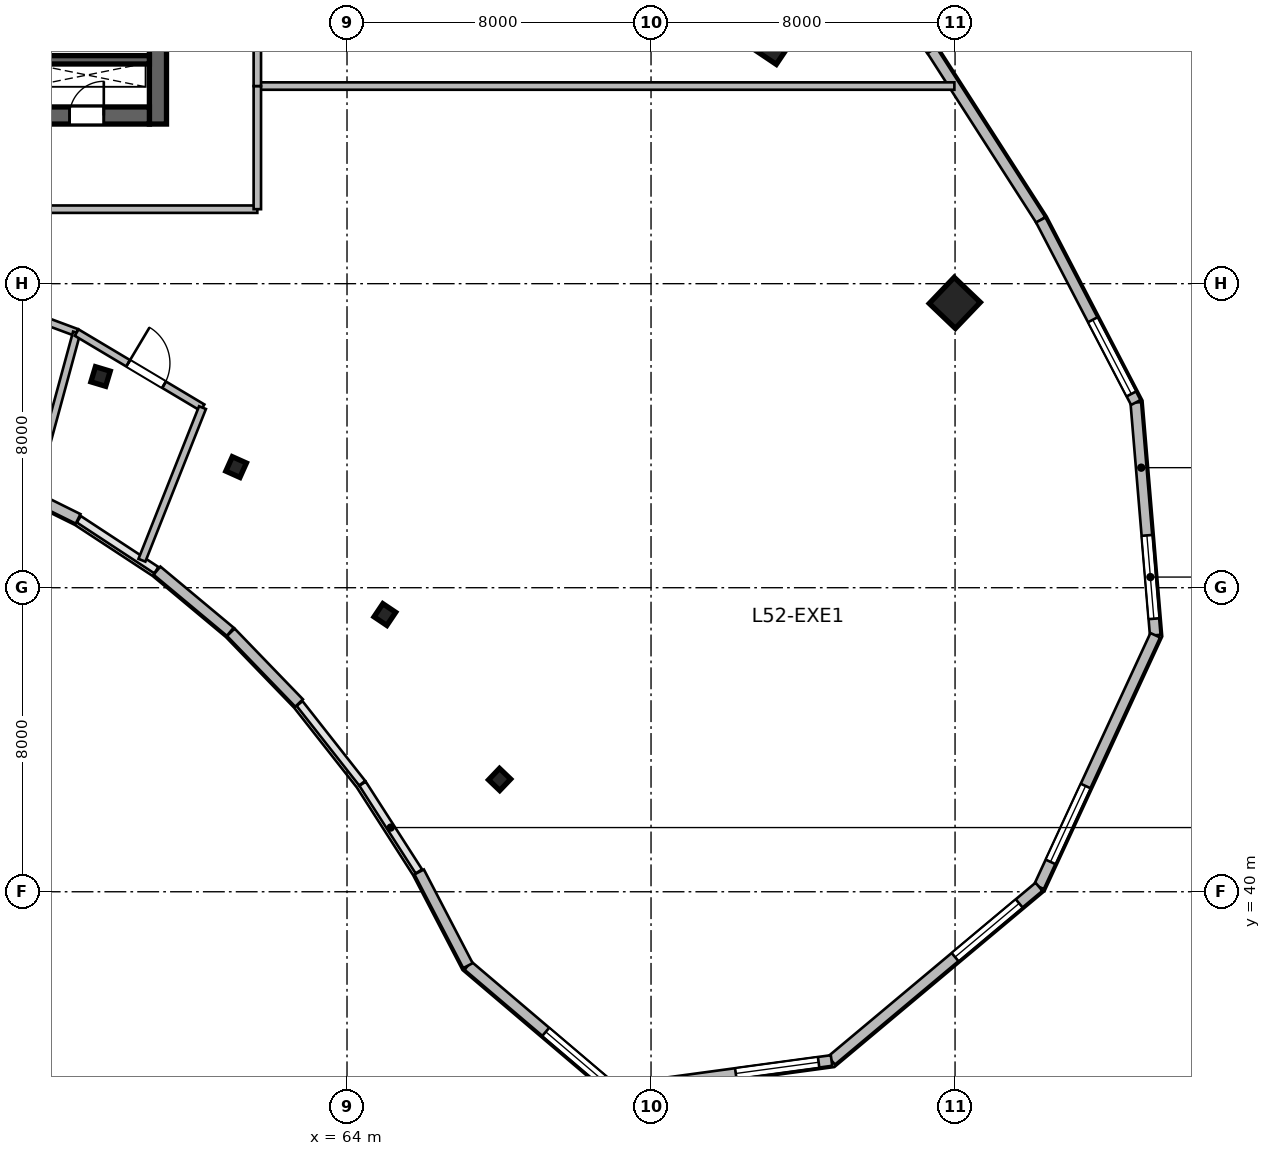
"""IFC4 building model, lengths in metres.
Left out: names, types, materials, properties, quantities, classifications, styles, units other than length and angle.
Written with IfcOpenShell. Run it as: python <this file> out.ifc"""

import sys

from ifc_helpers import new_model, si_unit, direction, frame, frame_2d, origin, origin_2d, place, context, subcontext, project, spatial, rectangle, i_section, extrude, source, transform, mapped, element, fill, save


model = new_model("IFC4")
c1 = context("Model", 3, precision=1e-05, world=origin(), true_north=direction((0.0, 1.0)))
c2 = subcontext(c1, "Body", "Model", "MODEL_VIEW")
j1 = project(units=[si_unit("LENGTHUNIT", "METRE"), si_unit("PLANEANGLEUNIT", "RADIAN")], contexts=[c1])
p1 = place(None, origin())
s1 = spatial("IfcSite", under=j1, at=p1, CompositionType="ELEMENT")
p2 = place(p1, origin())
s2 = spatial("IfcBuilding", under=s1, at=p2, CompositionType="ELEMENT")
p3 = place(p2, frame((0.0, 0.0, 215.7)))
s3 = spatial("IfcBuildingStorey", under=s2, at=p3, CompositionType="ELEMENT", Elevation=215.7)
m1 = source(origin(), c2, "Body", "SweptSolid", [
    extrude(rectangle(XDim=12.0, YDim=0.45, at=frame_2d((6.0, 0.0))), origin(), (0.0, 0.0, 1.0), 3.9),
])
p4 = place(p3, frame((59.025, 60.2, 0.0), z_axis=(0.0, 0.0, 1.0), x_axis=(0.0, 1.0, 0.0)))
e1 = element("IfcWall", 1, at=p4, inside=s3, PredefinedType="SHEAR", context=c2, shape_type="MappedRepresentation", body=[
    mapped(m1, transform((0.0, 0.0, 0.0), scale=1.0)),
])
m2 = source(origin(), c2, "Body", "SweptSolid", [
    extrude(rectangle(XDim=21.6, YDim=0.45, at=frame_2d((10.8, 0.0))), origin(), (0.0, 0.0, 1.0), 3.9),
])
p5 = place(p3, frame((37.2, 60.425, 0.0), z_axis=(0.0, 0.0, 1.0), x_axis=(1.0, 0.0, 0.0)))
e2 = element("IfcWall", 2, at=p5, inside=s3, PredefinedType="SHEAR", context=c2, shape_type="MappedRepresentation", body=[
    mapped(m2, transform((0.0, 0.0, 0.0), scale=1.0)),
])
p6 = place(p5, frame((1.1, 0.0, 0.0)))
e3 = element("IfcOpeningElement", 3, at=p6, cuts=e2, PredefinedType="OPENING", context=c2, shape_type="SweptSolid", body=[
    extrude(rectangle(XDim=1.15, YDim=2.15, at=frame_2d((0.575, 1.075))), frame((0.0, 0.235, 0.0), z_axis=(0.0, -1.0, 0.0), x_axis=(1.0, 0.0, 0.0)), (0.0, 0.0, 1.0), 0.47),
])
p7 = place(p5, frame((19.5, 0.0, 0.0)))
e4 = element("IfcOpeningElement", 4, at=p7, cuts=e2, PredefinedType="OPENING", context=c2, shape_type="SweptSolid", body=[
    extrude(rectangle(XDim=0.9, YDim=2.1, at=frame_2d((0.45, 1.05))), frame((0.0, 0.235, 0.0), z_axis=(0.0, -1.0, 0.0), x_axis=(1.0, 0.0, 0.0)), (0.0, 0.0, 1.0), 0.47),
])
p8 = place(p5, frame((12.02, 0.0, 0.0)))
e5 = element("IfcOpeningElement", 5, at=p8, cuts=e2, PredefinedType="OPENING", context=c2, shape_type="SweptSolid", body=[
    extrude(rectangle(XDim=1.6, YDim=2.15, at=frame_2d((0.8, 1.075))), frame((0.0, 0.235, 0.0), z_axis=(0.0, -1.0, 0.0), x_axis=(1.0, 0.0, 0.0)), (0.0, 0.0, 1.0), 0.47),
])
m3 = source(origin(), c2, "Body", "SweptSolid", [
    extrude(rectangle(XDim=3.27, YDim=0.22, at=frame_2d((1.635, 0.0))), origin(), (0.0, 0.0, 1.0), 3.9),
])
p9 = place(p3, frame((55.53, 61.89, 0.0), z_axis=(0.0, 0.0, 1.0), x_axis=(1.0, 0.0, 0.0)))
e6 = element("IfcWall", 6, at=p9, inside=s3, PredefinedType="SHEAR", context=c2, shape_type="MappedRepresentation", body=[
    mapped(m3, transform((0.0, 0.0, 0.0), scale=1.0)),
])
m4 = source(origin(), c2, "Body", "SweptSolid", [
    extrude(i_section(OverallWidth=0.406, OverallDepth=0.416, WebThickness=0.03, FlangeThickness=0.048, at=origin_2d()), origin(), (0.0, 0.0, 1.0), 3.9),
])
for number, where, z_axis, x_axis in (
    (7, (57.515, 53.558, 0.0), (0.0, 0.0, 1.0), (0.289, 0.957, 0.0)),
    (8, (61.082, 51.175, 0.0), (0.0, 0.0, 1.0), (0.409, 0.912, 0.0)),
    (9, (64.996, 47.294, 0.0), (0.0, 0.0, 1.0), (0.558, 0.83, 0.0)),
):
    element("IfcColumn", number, at=place(p3, frame(where, z_axis=z_axis, x_axis=x_axis)), inside=s3, PredefinedType="COLUMN", context=c2, shape_type="MappedRepresentation", body=[
        mapped(m4, transform((0.0, 0.0, 0.0), scale=1.0)),
    ])
m5 = source(origin(), c2, "Body", "SweptSolid", [
    extrude(rectangle(XDim=0.95, YDim=0.95, at=origin_2d()), origin(), (0.0, 0.0, 1.0), 3.9),
])
p10 = place(p3, frame((75.167, 62.43, 0.0), z_axis=(0.0, 0.0, 1.0), x_axis=(0.55774510898, 0.830012285095, 0.0)))
e10 = element("IfcColumn", 10, at=p10, inside=s3, PredefinedType="COLUMN", context=c2, shape_type="MappedRepresentation", body=[
    mapped(m5, transform((0.0, 0.0, 0.0), scale=1.0)),
])
p11 = place(p3, frame((68.015, 42.955, 0.0), z_axis=(0.0, 0.0, 1.0), x_axis=(0.690756218984, 0.723087716626, 0.0)))
e11 = element("IfcColumn", 11, at=p11, inside=s3, PredefinedType="COLUMN", context=c2, shape_type="MappedRepresentation", body=[
    mapped(m4, transform((0.0, 0.0, 0.0), scale=1.0)),
])
p12 = place(p3, frame((79.993, 55.494, 0.0), z_axis=(0.0, 0.0, 1.0), x_axis=(0.690756218984, 0.723087716626, 0.0)))
e12 = element("IfcColumn", 12, at=p12, inside=s3, PredefinedType="COLUMN", context=c2, shape_type="MappedRepresentation", body=[
    mapped(m5, transform((0.0, 0.0, 0.0), scale=1.0)),
])
m6 = source(origin(), c2, "Body", "SweptSolid", [
    extrude(rectangle(XDim=6.146, YDim=0.28, at=frame_2d((3.073, 0.0))), origin(), (0.0, 0.0, 1.0), 3.64),
])
p13 = place(p3, frame((84.756, 52.874, 0.0), z_axis=(0.0, 0.0, 1.0), x_axis=(0.083301904456, -0.996524356307, 0.0)))
e13 = element("IfcWall", 13, at=p13, inside=s3, PredefinedType="SOLIDWALL", context=c2, shape_type="MappedRepresentation", body=[
    mapped(m6, transform((0.0, 0.0, 0.0), scale=1.0)),
])
p14 = place(p13, frame((3.509, 0.0, 0.95)))
e14 = element("IfcOpeningElement", 14, at=p14, cuts=e13, PredefinedType="OPENING", context=c2, shape_type="SweptSolid", body=[
    extrude(rectangle(XDim=2.2, YDim=2.1, at=frame_2d((1.1, 1.05))), frame((0.0, 0.15, 0.0), z_axis=(0.0, -1.0, 0.0), x_axis=(1.0, 0.0, 0.0)), (0.0, 0.0, 1.0), 0.3),
])
m7 = source(origin(), c2, "Body", "SweptSolid", [
    extrude(rectangle(XDim=7.292, YDim=0.28, at=frame_2d((3.646, 0.0))), origin(), (0.0, 0.0, 1.0), 3.64),
])
p15 = place(p3, frame((85.268, 46.749, 0.0), z_axis=(0.0, 0.0, 1.0), x_axis=(-0.419642001049, -0.907689699708, 0.0)))
e15 = element("IfcWall", 15, at=p15, inside=s3, PredefinedType="SOLIDWALL", context=c2, shape_type="MappedRepresentation", body=[
    mapped(m7, transform((0.0, 0.0, 0.0), scale=1.0)),
])
p16 = place(p15, frame((4.369, 0.0, 0.95)))
e16 = element("IfcOpeningElement", 16, at=p16, cuts=e15, PredefinedType="OPENING", context=c2, shape_type="SweptSolid", body=[
    extrude(rectangle(XDim=2.2, YDim=2.1, at=frame_2d((1.1, 1.05))), frame((0.0, 0.15, 0.0), z_axis=(0.0, -1.0, 0.0), x_axis=(1.0, 0.0, 0.0)), (0.0, 0.0, 1.0), 0.3),
])
m8 = source(origin(), c2, "Body", "SweptSolid", [
    extrude(rectangle(XDim=7.12, YDim=0.28, at=frame_2d((3.56, 0.0))), origin(), (0.0, 0.0, 1.0), 3.64),
])
p17 = place(p3, frame((82.208, 40.131, 0.0), z_axis=(0.0, 0.0, 1.0), x_axis=(-0.766709783564, -0.641993853387, 0.0)))
e17 = element("IfcWall", 17, at=p17, inside=s3, PredefinedType="SOLIDWALL", context=c2, shape_type="MappedRepresentation", body=[
    mapped(m8, transform((0.0, 0.0, 0.0), scale=1.0)),
])
p18 = place(p17, frame((0.68, 0.0, 0.95)))
e18 = element("IfcOpeningElement", 18, at=p18, cuts=e17, PredefinedType="OPENING", context=c2, shape_type="SweptSolid", body=[
    extrude(rectangle(XDim=2.2, YDim=2.1, at=frame_2d((1.1, 1.05))), frame((0.0, 0.15, 0.0), z_axis=(0.0, -1.0, 0.0), x_axis=(1.0, 0.0, 0.0)), (0.0, 0.0, 1.0), 0.3),
])
m9 = source(origin(), c2, "Body", "SweptSolid", [
    extrude(rectangle(XDim=5.771, YDim=0.28, at=frame_2d((2.886, 0.0))), origin(), (0.0, 0.0, 1.0), 3.64),
])
p19 = place(p3, frame((76.75, 35.56, 0.0), z_axis=(0.0, 0.0, 1.0), x_axis=(-0.990933615537, -0.134352408237, 0.0)))
e19 = element("IfcWall", 19, at=p19, inside=s3, PredefinedType="SOLIDWALL", context=c2, shape_type="MappedRepresentation", body=[
    mapped(m9, transform((0.0, 0.0, 0.0), scale=1.0)),
])
p20 = place(p19, frame((0.343, 0.0, 0.95)))
e20 = element("IfcOpeningElement", 20, at=p20, cuts=e19, PredefinedType="OPENING", context=c2, shape_type="SweptSolid", body=[
    extrude(rectangle(XDim=2.2, YDim=2.1, at=frame_2d((1.1, 1.05))), frame((0.0, 0.15, 0.0), z_axis=(0.0, -1.0, 0.0), x_axis=(1.0, 0.0, 0.0)), (0.0, 0.0, 1.0), 0.3),
])
m10 = source(origin(), c2, "Body", "SweptSolid", [
    extrude(rectangle(XDim=5.051, YDim=0.28, at=frame_2d((2.525, 0.0))), origin(), (0.0, 0.0, 1.0), 3.64),
])
p21 = place(p3, frame((71.031, 34.784, 0.0), z_axis=(0.0, 0.0, 1.0), x_axis=(-0.761904731537, 0.647689107568, 0.0)))
e21 = element("IfcWall", 21, at=p21, inside=s3, PredefinedType="SOLIDWALL", context=c2, shape_type="MappedRepresentation", body=[
    mapped(m10, transform((0.0, 0.0, 0.0), scale=1.0)),
])
p22 = place(p21, frame((0.163, 0.0, 0.95)))
e22 = element("IfcOpeningElement", 22, at=p22, cuts=e21, PredefinedType="OPENING", context=c2, shape_type="SweptSolid", body=[
    extrude(rectangle(XDim=2.2, YDim=2.1, at=frame_2d((1.1, 1.05))), frame((0.0, 0.15, 0.0), z_axis=(0.0, -1.0, 0.0), x_axis=(1.0, 0.0, 0.0)), (0.0, 0.0, 1.0), 0.3),
])
m11 = source(origin(), c2, "Body", "SweptSolid", [
    extrude(rectangle(XDim=2.779, YDim=0.28, at=frame_2d((1.39, 0.0))), origin(), (0.0, 0.0, 1.0), 3.64),
])
p23 = place(p3, frame((67.182, 38.056, 0.0), z_axis=(0.0, 0.0, 1.0), x_axis=(-0.461770308601, 0.886999538948, 0.0)))
e23 = element("IfcWall", 23, at=p23, inside=s3, PredefinedType="SOLIDWALL", context=c2, shape_type="MappedRepresentation", body=[
    mapped(m11, transform((0.0, 0.0, 0.0), scale=1.0)),
])
m12 = source(origin(), c2, "Body", "SweptSolid", [
    extrude(rectangle(XDim=2.588, YDim=0.28, at=frame_2d((1.294, 0.0))), origin(), (0.0, 0.0, 1.0), 3.64),
])
p24 = place(p3, frame((62.74, 44.966, 0.0), z_axis=(0.0, 0.0, 1.0), x_axis=(-0.694687114507, 0.719312041424, 0.0)))
e24 = element("IfcWall", 24, at=p24, inside=s3, PredefinedType="SOLIDWALL", context=c2, shape_type="MappedRepresentation", body=[
    mapped(m12, transform((0.0, 0.0, 0.0), scale=1.0)),
])
m13 = source(origin(), c2, "Body", "SweptSolid", [
    extrude(rectangle(XDim=2.511, YDim=0.28, at=frame_2d((1.256, 0.0))), origin(), (0.0, 0.0, 1.0), 3.64),
])
p25 = place(p3, frame((60.928, 46.841, 0.0), z_axis=(0.0, 0.0, 1.0), x_axis=(-0.767910416122, 0.640557251782, 0.0)))
e25 = element("IfcWall", 25, at=p25, inside=s3, PredefinedType="SOLIDWALL", context=c2, shape_type="MappedRepresentation", body=[
    mapped(m13, transform((0.0, 0.0, 0.0), scale=1.0)),
])
m14 = source(origin(), c2, "Body", "SweptSolid", [
    extrude(rectangle(XDim=2.378, YDim=0.28, at=frame_2d((1.189, 0.0))), origin(), (0.0, 0.0, 1.0), 3.64),
])
p26 = place(p3, frame((56.924, 49.812, 0.0), z_axis=(0.0, 0.0, 1.0), x_axis=(-0.895941616831, 0.444171835252, 0.0)))
e26 = element("IfcWall", 26, at=p26, inside=s3, PredefinedType="SOLIDWALL", context=c2, shape_type="MappedRepresentation", body=[
    mapped(m14, transform((0.0, 0.0, 0.0), scale=1.0)),
])
m15 = source(origin(), c2, "Body", "SweptSolid", [
    extrude(rectangle(XDim=5.153, YDim=0.28, at=frame_2d((2.577, 0.0))), origin(), (0.0, 0.0, 1.0), 3.64),
])
p27 = place(p3, frame((76.205, 66.19, 0.0), z_axis=(0.0, 0.0, 1.0), x_axis=(0.618179283891, -0.786037132054, 0.0)))
e27 = element("IfcWall", 27, at=p27, inside=s3, PredefinedType="SOLIDWALL", context=c2, shape_type="MappedRepresentation", body=[
    mapped(m15, transform((0.0, 0.0, 0.0), scale=1.0)),
])
m16 = source(origin(), c2, "Body", "SweptSolid", [
    extrude(rectangle(XDim=5.303, YDim=0.28, at=frame_2d((2.651, 0.0))), origin(), (0.0, 0.0, 1.0), 3.64),
])
p28 = place(p3, frame((79.391, 62.14, 0.0), z_axis=(0.0, 0.0, 1.0), x_axis=(0.540178067041, -0.84155074469, 0.0)))
e28 = element("IfcWall", 28, at=p28, inside=s3, PredefinedType="SOLIDWALL", context=c2, shape_type="MappedRepresentation", body=[
    mapped(m16, transform((0.0, 0.0, 0.0), scale=1.0)),
])
m17 = source(origin(), c2, "Body", "SweptSolid", [
    extrude(rectangle(XDim=5.416, YDim=0.28, at=frame_2d((2.708, 0.0))), origin(), (0.0, 0.0, 1.0), 3.64),
])
p29 = place(p3, frame((82.255, 57.677, 0.0), z_axis=(0.0, 0.0, 1.0), x_axis=(0.46177852435, -0.886995261796, 0.0)))
e29 = element("IfcWall", 29, at=p29, inside=s3, PredefinedType="SOLIDWALL", context=c2, shape_type="MappedRepresentation", body=[
    mapped(m17, transform((0.0, 0.0, 0.0), scale=1.0)),
])
p30 = place(p29, frame((2.962, 0.0, 0.95)))
e30 = element("IfcOpeningElement", 30, at=p30, cuts=e29, PredefinedType="OPENING", context=c2, shape_type="SweptSolid", body=[
    extrude(rectangle(XDim=2.2, YDim=2.1, at=frame_2d((1.1, 1.05))), frame((0.0, 0.15, 0.0), z_axis=(0.0, -1.0, 0.0), x_axis=(1.0, 0.0, 0.0)), (0.0, 0.0, 1.0), 0.3),
])
m18 = source(origin(), c2, "Body", "SweptSolid", [
    extrude(rectangle(XDim=4.191, YDim=0.195, at=frame_2d((2.095, 0.0))), origin(), (0.0, 0.0, 1.0), 3.64),
])
p31 = place(p3, frame((52.957, 56.174, 0.0), z_axis=(0.0, 0.0, 1.0), x_axis=(0.937361695407, -0.348357649527, 0.0)))
e31 = element("IfcWall", 31, at=p31, inside=s3, PredefinedType="PARTITIONING", context=c2, shape_type="MappedRepresentation", body=[
    mapped(m18, transform((0.0, 0.0, 0.0), scale=1.0)),
])
p32 = place(p31, frame((1.545, 0.0, 0.0)))
e32 = element("IfcOpeningElement", 32, at=p32, cuts=e31, PredefinedType="OPENING", context=c2, shape_type="SweptSolid", body=[
    extrude(rectangle(XDim=1.1, YDim=2.15, at=frame_2d((0.55, 1.075))), frame((0.0, 0.107, 0.0), z_axis=(0.0, -1.0, 0.0), x_axis=(1.0, 0.0, 0.0)), (0.0, 0.0, 1.0), 0.215),
])
m19 = source(origin(), c2, "Body", "SweptSolid", [
    extrude(rectangle(XDim=4.449, YDim=0.195, at=frame_2d((2.225, 0.0))), origin(), (0.0, 0.0, 1.0), 3.64),
])
p33 = place(p3, frame((55.719, 50.42, 0.0), z_axis=(0.0, 0.0, 1.0), x_axis=(0.262123660516, 0.965034292965, 0.0)))
e33 = element("IfcWall", 33, at=p33, inside=s3, PredefinedType="PARTITIONING", context=c2, shape_type="MappedRepresentation", body=[
    mapped(m19, transform((0.0, 0.0, 0.0), scale=1.0)),
])
m20 = source(origin(), c2, "Body", "SweptSolid", [
    extrude(rectangle(XDim=3.856, YDim=0.195, at=frame_2d((1.928, 0.0))), origin(), (0.0, 0.0, 1.0), 3.64),
])
p34 = place(p3, frame((56.886, 54.714, 0.0), z_axis=(0.0, 0.0, 1.0), x_axis=(0.858797511375, -0.512315171019, 0.0)))
e34 = element("IfcWall", 34, at=p34, inside=s3, PredefinedType="PARTITIONING", context=c2, shape_type="MappedRepresentation", body=[
    mapped(m20, transform((0.0, 0.0, 0.0), scale=1.0)),
])
p35 = place(p34, frame((1.578, 0.0, 0.0)))
e35 = element("IfcOpeningElement", 35, at=p35, cuts=e34, PredefinedType="OPENING", context=c2, shape_type="SweptSolid", body=[
    extrude(rectangle(XDim=1.1, YDim=2.15, at=frame_2d((0.55, 1.075))), frame((0.0, 0.107, 0.0), z_axis=(0.0, -1.0, 0.0), x_axis=(1.0, 0.0, 0.0)), (0.0, 0.0, 1.0), 0.215),
])
m21 = source(origin(), c2, "Body", "SweptSolid", [
    extrude(rectangle(XDim=4.32, YDim=0.195, at=frame_2d((2.16, 0.0))), origin(), (0.0, 0.0, 1.0), 3.64),
])
p36 = place(p3, frame((58.604, 48.723, 0.0), z_axis=(0.0, 0.0, 1.0), x_axis=(0.368846295269, 0.929490403644, 0.0)))
e36 = element("IfcWall", 36, at=p36, inside=s3, PredefinedType="PARTITIONING", context=c2, shape_type="MappedRepresentation", body=[
    mapped(m21, transform((0.0, 0.0, 0.0), scale=1.0)),
])
m22 = source(origin(), c2, "Body", "SweptSolid", [
    extrude(rectangle(XDim=12.39, YDim=0.195, at=frame_2d((6.195, 0.0))), origin(), (0.0, 0.0, 1.0), 3.64),
])
p37 = place(p3, frame((49.25, 57.96, 0.0), z_axis=(0.0, 0.0, 1.0), x_axis=(1.0, 0.0, 0.0)))
e37 = element("IfcWall", 37, at=p37, inside=s3, PredefinedType="PARTITIONING", context=c2, shape_type="MappedRepresentation", body=[
    mapped(m22, transform((0.0, 0.0, 0.0), scale=1.0)),
])
m23 = source(origin(), c2, "Body", "SweptSolid", [
    extrude(rectangle(XDim=18.342, YDim=0.195, at=frame_2d((9.171, 0.0))), origin(), (0.0, 0.0, 1.0), 3.64),
])
p38 = place(p3, frame((61.64, 61.2, 0.0), z_axis=(0.0, 0.0, 1.0), x_axis=(1.0, 0.0, 0.0)))
e38 = element("IfcWall", 38, at=p38, inside=s3, PredefinedType="PARTITIONING", context=c2, shape_type="MappedRepresentation", body=[
    mapped(m23, transform((0.0, 0.0, 0.0), scale=1.0)),
])
m24 = source(origin(), c2, "Body", "SweptSolid", [
    extrude(rectangle(XDim=3.24, YDim=0.195, at=frame_2d((1.62, 0.0))), origin(), (0.0, 0.0, 1.0), 3.64),
])
p39 = place(p3, frame((61.64, 57.96, 0.0), z_axis=(0.0, 0.0, 1.0), x_axis=(0.0, 1.0, 0.0)))
e39 = element("IfcWall", 39, at=p39, inside=s3, PredefinedType="PARTITIONING", context=c2, shape_type="MappedRepresentation", body=[
    mapped(m24, transform((0.0, 0.0, 0.0), scale=1.0)),
])
m25 = source(origin(), c2, "Body", "SweptSolid", [
    extrude(rectangle(XDim=4.0, YDim=0.195, at=frame_2d((2.0, 0.0))), origin(), (0.0, 0.0, 1.0), 3.64),
])
p40 = place(p3, frame((61.64, 61.2, 0.0), z_axis=(0.0, 0.0, 1.0), x_axis=(0.0, 1.0, 0.0)))
e40 = element("IfcWall", 40, at=p40, inside=s3, PredefinedType="PARTITIONING", context=c2, shape_type="MappedRepresentation", body=[
    mapped(m25, transform((0.0, 0.0, 0.0), scale=1.0)),
])
p41 = place(p40, frame((1.045, 0.0, 0.0)))
e41 = element("IfcOpeningElement", 41, at=p41, cuts=e40, PredefinedType="OPENING", context=c2, shape_type="SweptSolid", body=[
    extrude(rectangle(XDim=0.95, YDim=2.1, at=frame_2d((0.475, 1.05))), frame((0.0, 0.107, 0.0), z_axis=(0.0, -1.0, 0.0), x_axis=(1.0, 0.0, 0.0)), (0.0, 0.0, 1.0), 0.215),
])
m26 = source(origin(), c2, "Body", "SweptSolid", [
    extrude(rectangle(XDim=2.2, YDim=2.1, at=frame_2d((1.1, 1.05))), frame((0.0, 0.03, 0.0), z_axis=(0.0, -1.0, 0.0), x_axis=(1.0, 0.0, 0.0)), (0.0, 0.0, 1.0), 0.06),
])
p42 = place(p14, origin())
e42 = element("IfcWindow", 42, at=p42, inside=s3, PartitioningType="TRIPLE_PANEL_VERTICAL", PredefinedType="WINDOW", context=c2, shape_type="MappedRepresentation", body=[
    mapped(m26, transform((0.0, 0.0, 0.0), scale=1.0)),
])
fill(e14, e42)
p43 = place(p16, origin())
e43 = element("IfcWindow", 43, at=p43, inside=s3, PartitioningType="TRIPLE_PANEL_VERTICAL", PredefinedType="WINDOW", context=c2, shape_type="MappedRepresentation", body=[
    mapped(m26, transform((0.0, 0.0, 0.0), scale=1.0)),
])
fill(e16, e43)
p44 = place(p18, origin())
e44 = element("IfcWindow", 44, at=p44, inside=s3, PartitioningType="TRIPLE_PANEL_VERTICAL", PredefinedType="WINDOW", context=c2, shape_type="MappedRepresentation", body=[
    mapped(m26, transform((0.0, 0.0, 0.0), scale=1.0)),
])
fill(e18, e44)
p45 = place(p20, origin())
e45 = element("IfcWindow", 45, at=p45, inside=s3, PartitioningType="TRIPLE_PANEL_VERTICAL", PredefinedType="WINDOW", context=c2, shape_type="MappedRepresentation", body=[
    mapped(m26, transform((0.0, 0.0, 0.0), scale=1.0)),
])
fill(e20, e45)
p46 = place(p22, origin())
e46 = element("IfcWindow", 46, at=p46, inside=s3, PartitioningType="TRIPLE_PANEL_VERTICAL", PredefinedType="WINDOW", context=c2, shape_type="MappedRepresentation", body=[
    mapped(m26, transform((0.0, 0.0, 0.0), scale=1.0)),
])
fill(e22, e46)
p47 = place(p30, origin())
e47 = element("IfcWindow", 47, at=p47, inside=s3, PartitioningType="TRIPLE_PANEL_VERTICAL", PredefinedType="WINDOW", context=c2, shape_type="MappedRepresentation", body=[
    mapped(m26, transform((0.0, 0.0, 0.0), scale=1.0)),
])
fill(e30, e47)
m27 = source(origin(), c2, "Body", "SweptSolid", [
    extrude(rectangle(XDim=0.9, YDim=2.1, at=frame_2d((0.45, 1.05))), frame((0.0, 0.025, 0.0), z_axis=(0.0, -1.0, 0.0), x_axis=(1.0, 0.0, 0.0)), (0.0, 0.0, 1.0), 0.05),
])
p48 = place(p7, origin())
e48 = element("IfcDoor", 48, at=p48, inside=s3, OperationType="SINGLE_SWING_RIGHT", PredefinedType="DOOR", context=c2, shape_type="MappedRepresentation", body=[
    mapped(m27, transform((0.0, 0.0, 0.0), scale=1.0)),
])
fill(e4, e48)
m28 = source(origin(), c2, "Body", "SweptSolid", [
    extrude(rectangle(XDim=1.1, YDim=2.15, at=frame_2d((0.55, 1.075))), frame((0.0, 0.025, 0.0), z_axis=(0.0, -1.0, 0.0), x_axis=(1.0, 0.0, 0.0)), (0.0, 0.0, 1.0), 0.05),
])
p49 = place(p35, origin())
e49 = element("IfcDoor", 49, at=p49, inside=s3, OperationType="SINGLE_SWING_LEFT", PredefinedType="DOOR", context=c2, shape_type="MappedRepresentation", body=[
    mapped(m28, transform((0.0, 0.0, 0.0), scale=1.0)),
])
fill(e35, e49)
save(model, sys.argv[1])
